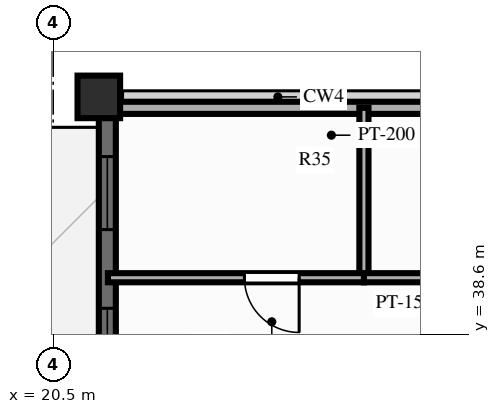
"""IFC4 building model, lengths in metres.
Left out: names, types, materials, properties, quantities, classifications, styles, units other than length and angle.
Written with IfcOpenShell. Run it as: python <this file> out.ifc"""

import sys

from ifc_helpers import new_model, si_unit, direction, frame, frame_2d, origin, origin_2d, place, context, subcontext, project, spatial, rectangle, extrude, source, transform, mapped, element, fill, save


model = new_model("IFC4")
c1 = context("Model", 3, precision=1e-05, world=origin(), true_north=direction((0.0, 1.0)))
c2 = subcontext(c1, "Body", "Model", "MODEL_VIEW")
j1 = project(units=[si_unit("LENGTHUNIT", "METRE"), si_unit("PLANEANGLEUNIT", "RADIAN")], contexts=[c1])
p1 = place(None, origin())
s1 = spatial("IfcSite", under=j1, at=p1, CompositionType="ELEMENT")
p2 = place(p1, origin())
s2 = spatial("IfcBuilding", under=s1, at=p2, CompositionType="ELEMENT")
p3 = place(p2, frame((0.0, 0.0, 236.1)))
s3 = spatial("IfcBuildingStorey", under=s2, at=p3, CompositionType="ELEMENT", Elevation=236.1)
m1 = source(origin(), c2, "Body", "SweptSolid", [
    extrude(rectangle(XDim=0.7, YDim=0.7, at=origin_2d()), origin(), (0.0, 0.0, 1.0), 3.9),
])
p4 = place(p3, frame((21.25, 42.5, 0.0), z_axis=(0.0, 0.0, 1.0), x_axis=(1.0, 0.0, 0.0)))
e1 = element("IfcColumn", 1, at=p4, inside=s3, PredefinedType="COLUMN", context=c2, shape_type="MappedRepresentation", body=[
    mapped(m1, transform((0.0, 0.0, 0.0), scale=1.0)),
])
p5 = place(p3, frame((21.39, 11.5, 0.0), z_axis=(0.0, 0.0, 1.0), x_axis=(0.0, 1.0, 0.0)))
e2 = element("IfcWall", 2, at=p5, inside=s3, PredefinedType="SOLIDWALL", context=c2, shape_type="SweptSolid", body=[
    extrude(rectangle(XDim=31.0, YDim=0.28, at=frame_2d((15.5, 0.0))), origin(), (0.0, 0.0, 1.0), 2.44),
])
p6 = place(p5, frame((0.7, 0.0, 0.25)))
e3 = element("IfcOpeningElement", 3, at=p6, cuts=e2, PredefinedType="OPENING", context=c2, shape_type="SweptSolid", body=[
    extrude(rectangle(XDim=1.2, YDim=1.5, at=frame_2d((0.6, 0.75))), frame((0.0, 0.152, 0.0), z_axis=(0.0, -1.0, 0.0), x_axis=(1.0, 0.0, 0.0)), (0.0, 0.0, 1.0), 0.304),
])
p7 = place(p5, frame((3.195, 0.0, 0.25)))
e4 = element("IfcOpeningElement", 4, at=p7, cuts=e2, PredefinedType="OPENING", context=c2, shape_type="SweptSolid", body=[
    extrude(rectangle(XDim=1.2, YDim=1.5, at=frame_2d((0.6, 0.75))), frame((0.0, 0.152, 0.0), z_axis=(0.0, -1.0, 0.0), x_axis=(1.0, 0.0, 0.0)), (0.0, 0.0, 1.0), 0.304),
])
p8 = place(p5, frame((7.068, 0.0, 0.25)))
e5 = element("IfcOpeningElement", 5, at=p8, cuts=e2, PredefinedType="OPENING", context=c2, shape_type="SweptSolid", body=[
    extrude(rectangle(XDim=0.7, YDim=1.5, at=frame_2d((0.35, 0.75))), frame((0.0, 0.152, 0.0), z_axis=(0.0, -1.0, 0.0), x_axis=(1.0, 0.0, 0.0)), (0.0, 0.0, 1.0), 0.304),
])
p9 = place(p5, frame((8.662, 0.0, 0.25)))
e6 = element("IfcOpeningElement", 6, at=p9, cuts=e2, PredefinedType="OPENING", context=c2, shape_type="SweptSolid", body=[
    extrude(rectangle(XDim=1.2, YDim=1.5, at=frame_2d((0.6, 0.75))), frame((0.0, 0.152, 0.0), z_axis=(0.0, -1.0, 0.0), x_axis=(1.0, 0.0, 0.0)), (0.0, 0.0, 1.0), 0.304),
])
p10 = place(p5, frame((11.131, 0.0, 0.25)))
e7 = element("IfcOpeningElement", 7, at=p10, cuts=e2, PredefinedType="OPENING", context=c2, shape_type="SweptSolid", body=[
    extrude(rectangle(XDim=1.2, YDim=1.5, at=frame_2d((0.6, 0.75))), frame((0.0, 0.152, 0.0), z_axis=(0.0, -1.0, 0.0), x_axis=(1.0, 0.0, 0.0)), (0.0, 0.0, 1.0), 0.304),
])
p11 = place(p5, frame((13.999, 0.0, 0.25)))
e8 = element("IfcOpeningElement", 8, at=p11, cuts=e2, PredefinedType="OPENING", context=c2, shape_type="SweptSolid", body=[
    extrude(rectangle(XDim=1.2, YDim=1.5, at=frame_2d((0.6, 0.75))), frame((0.0, 0.152, 0.0), z_axis=(0.0, -1.0, 0.0), x_axis=(1.0, 0.0, 0.0)), (0.0, 0.0, 1.0), 0.304),
])
p12 = place(p5, frame((17.565, 0.0, 0.0)))
e9 = element("IfcOpeningElement", 9, at=p12, cuts=e2, PredefinedType="OPENING", context=c2, shape_type="SweptSolid", body=[
    extrude(rectangle(XDim=1.6, YDim=2.15, at=frame_2d((0.8, 1.075))), frame((0.0, 0.152, 0.0), z_axis=(0.0, -1.0, 0.0), x_axis=(1.0, 0.0, 0.0)), (0.0, 0.0, 1.0), 0.304),
])
p13 = place(p5, frame((21.441, 0.0, 0.25)))
e10 = element("IfcOpeningElement", 10, at=p13, cuts=e2, PredefinedType="OPENING", context=c2, shape_type="SweptSolid", body=[
    extrude(rectangle(XDim=1.2, YDim=1.5, at=frame_2d((0.6, 0.75))), frame((0.0, 0.152, 0.0), z_axis=(0.0, -1.0, 0.0), x_axis=(1.0, 0.0, 0.0)), (0.0, 0.0, 1.0), 0.304),
])
p14 = place(p5, frame((26.323, 0.0, 0.25)))
e11 = element("IfcOpeningElement", 11, at=p14, cuts=e2, PredefinedType="OPENING", context=c2, shape_type="SweptSolid", body=[
    extrude(rectangle(XDim=1.2, YDim=1.5, at=frame_2d((0.6, 0.75))), frame((0.0, 0.152, 0.0), z_axis=(0.0, -1.0, 0.0), x_axis=(1.0, 0.0, 0.0)), (0.0, 0.0, 1.0), 0.304),
])
p15 = place(p5, frame((28.818, 0.0, 0.25)))
e12 = element("IfcOpeningElement", 12, at=p15, cuts=e2, PredefinedType="OPENING", context=c2, shape_type="SweptSolid", body=[
    extrude(rectangle(XDim=1.2, YDim=1.5, at=frame_2d((0.6, 0.75))), frame((0.0, 0.152, 0.0), z_axis=(0.0, -1.0, 0.0), x_axis=(1.0, 0.0, 0.0)), (0.0, 0.0, 1.0), 0.304),
])
p16 = place(p3, frame((28.75, 42.32, 0.0), z_axis=(0.0, 0.0, 1.0), x_axis=(-1.0, 0.0, 0.0)))
e13 = element("IfcWall", 13, at=p16, inside=s3, PredefinedType="PARTITIONING", context=c2, shape_type="SweptSolid", body=[
    extrude(rectangle(XDim=7.35, YDim=0.2, at=frame_2d((3.675, 0.0))), origin(), (0.0, 0.0, 1.0), 2.24),
])
p17 = place(p3, frame((25.61, 39.526, 0.0), z_axis=(0.0, 0.0, 1.0), x_axis=(0.0, 1.0, 0.0)))
e14 = element("IfcWall", 14, at=p17, inside=s3, PredefinedType="PARTITIONING", context=c2, shape_type="SweptSolid", body=[
    extrude(rectangle(XDim=2.794, YDim=0.15, at=frame_2d((1.397, 0.0))), origin(), (0.0, 0.0, 1.0), 3.56),
])
p18 = place(p3, frame((28.75, 39.526, 0.0), z_axis=(0.0, 0.0, 1.0), x_axis=(-1.0, 0.0, 0.0)))
e15 = element("IfcWall", 15, at=p18, inside=s3, PredefinedType="PARTITIONING", context=c2, shape_type="SweptSolid", body=[
    extrude(rectangle(XDim=3.14, YDim=0.15, at=frame_2d((1.57, 0.0))), origin(), (0.0, 0.0, 1.0), 3.56),
])
p19 = place(p18, frame((0.68, 0.0, 0.0)))
e16 = element("IfcOpeningElement", 16, at=p19, cuts=e15, PredefinedType="OPENING", context=c2, shape_type="SweptSolid", body=[
    extrude(rectangle(XDim=0.9, YDim=2.1, at=frame_2d((0.45, 1.05))), frame((0.0, 0.087, 0.0), z_axis=(0.0, -1.0, 0.0), x_axis=(1.0, 0.0, 0.0)), (0.0, 0.0, 1.0), 0.174),
])
p20 = place(p3, frame((25.61, 39.526, 0.0), z_axis=(0.0, 0.0, 1.0), x_axis=(-1.0, 0.0, 0.0)))
e17 = element("IfcWall", 17, at=p20, inside=s3, PredefinedType="PARTITIONING", context=c2, shape_type="SweptSolid", body=[
    extrude(rectangle(XDim=4.21, YDim=0.15, at=frame_2d((2.105, 0.0))), origin(), (0.0, 0.0, 1.0), 3.56),
])
p21 = place(p20, frame((1.065, 0.0, 0.0)))
e18 = element("IfcOpeningElement", 18, at=p21, cuts=e17, PredefinedType="OPENING", context=c2, shape_type="SweptSolid", body=[
    extrude(rectangle(XDim=0.9, YDim=2.1, at=frame_2d((0.45, 1.05))), frame((0.0, 0.087, 0.0), z_axis=(0.0, -1.0, 0.0), x_axis=(1.0, 0.0, 0.0)), (0.0, 0.0, 1.0), 0.174),
])
m2 = source(origin(), c2, "Body", "SweptSolid", [
    extrude(rectangle(XDim=1.2, YDim=1.5, at=frame_2d((0.6, 0.75))), frame((0.0, 0.03, 0.0), z_axis=(0.0, -1.0, 0.0), x_axis=(1.0, 0.0, 0.0)), (0.0, 0.0, 1.0), 0.06),
])
p22 = place(p14, origin())
e19 = element("IfcWindow", 19, at=p22, inside=s3, PartitioningType="SINGLE_PANEL", PredefinedType="WINDOW", context=c2, shape_type="MappedRepresentation", body=[
    mapped(m2, transform((0.0, 0.0, 0.0), scale=1.0)),
])
fill(e11, e19)
p23 = place(p15, origin())
e20 = element("IfcWindow", 20, at=p23, inside=s3, PartitioningType="SINGLE_PANEL", PredefinedType="WINDOW", context=c2, shape_type="MappedRepresentation", body=[
    mapped(m2, transform((0.0, 0.0, 0.0), scale=1.0)),
])
fill(e12, e20)
m3 = source(origin(), c2, "Body", "SweptSolid", [
    extrude(rectangle(XDim=0.9, YDim=2.1, at=frame_2d((0.45, 1.05))), frame((0.0, 0.025, 0.0), z_axis=(0.0, -1.0, 0.0), x_axis=(1.0, 0.0, 0.0)), (0.0, 0.0, 1.0), 0.05),
])
p24 = place(p21, origin())
e21 = element("IfcDoor", 21, at=p24, inside=s3, OperationType="SINGLE_SWING_LEFT", PredefinedType="DOOR", context=c2, shape_type="MappedRepresentation", body=[
    mapped(m3, transform((0.0, 0.0, 0.0), scale=1.0)),
])
fill(e18, e21)
save(model, sys.argv[1])
